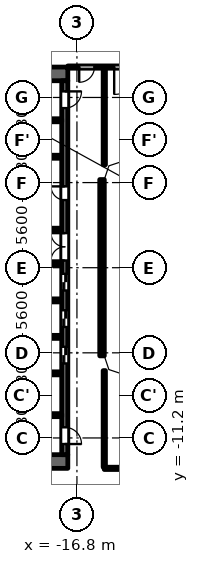
"""IFC4 building model, lengths in metres.
Left out: names, types, materials, properties, quantities, classifications, styles, units other than length and angle.
Written with IfcOpenShell. Run it as: python <this file> out.ifc"""

import sys

from ifc_helpers import new_model, si_unit, direction, frame, frame_2d, origin, place, context, subcontext, project, spatial, polyline, rectangle, outline, extrude, element, fill, save


model = new_model("IFC4")
c1 = context("Model", 3, precision=1e-05, world=origin(), true_north=direction((0.0, 1.0)))
c2 = subcontext(c1, "Body", "Model", "MODEL_VIEW")
j1 = project(units=[si_unit("LENGTHUNIT", "METRE"), si_unit("PLANEANGLEUNIT", "RADIAN")], contexts=[c1])
p1 = place(None, origin())
s1 = spatial("IfcSite", under=j1, at=p1, CompositionType="ELEMENT")
p2 = place(p1, origin())
s2 = spatial("IfcBuilding", under=s1, at=p2, CompositionType="ELEMENT")
p3 = place(p2, frame((0.0, 0.0, 16.1)))
s3 = spatial("IfcBuildingStorey", under=s2, at=p3, CompositionType="ELEMENT", Elevation=16.1)
p4 = place(p3, frame((-15.15, -5.8, 0.0), z_axis=(0.0, 0.0, 1.0), x_axis=(0.0, 1.0, 0.0)))
e1 = element("IfcWall", 1, at=p4, inside=s3, PredefinedType="SOLIDWALL", context=c2, shape_type="SweptSolid", body=[
    extrude(rectangle(XDim=11.6, YDim=0.3, at=frame_2d((5.8, 0.0))), origin(), (0.0, 0.0, 1.0), 4.45),
])
for number, where, z_axis, x_axis in (
    (2, (-17.4, 12.75, 0.0), (0.0, 0.0, 1.0), (-1.0, 0.0, 0.0)),
    (3, (-17.4, -12.75, 0.0), (0.0, 0.0, 1.0), (-1.0, 0.0, 0.0)),
):
    element("IfcWall", number, at=place(p3, frame(where, z_axis=z_axis, x_axis=x_axis)), inside=s3, PredefinedType="SHEAR", context=c2, shape_type="SweptSolid", body=[
        extrude(rectangle(XDim=10.4, YDim=0.9, at=frame_2d((5.2, 0.0))), origin(), (0.0, 0.0, 1.0), 4.45),
    ])
p5 = place(p3, frame((-17.6, -12.3, 0.0), z_axis=(0.0, 0.0, 1.0), x_axis=(0.0, 1.0, 0.0)))
e4 = element("IfcWall", 4, at=p5, inside=s3, PredefinedType="SHEAR", context=c2, shape_type="SweptSolid", body=[
    extrude(rectangle(XDim=24.6, YDim=0.4, at=frame_2d((12.3, 0.0))), origin(), (0.0, 0.0, 1.0), 4.45),
])
p6 = place(p5, frame((6.0, 0.0, 0.0)))
e5 = element("IfcOpeningElement", 5, at=p6, cuts=e4, PredefinedType="OPENING", context=c2, shape_type="SweptSolid", body=[
    extrude(rectangle(XDim=1.1, YDim=2.1, at=frame_2d((0.55, 1.05))), frame((0.0, 0.21, 0.0), z_axis=(0.0, -1.0, 0.0), x_axis=(1.0, 0.0, 0.0)), (0.0, 0.0, 1.0), 0.42),
])
p7 = place(p5, frame((8.4, 0.0, 0.0)))
e6 = element("IfcOpeningElement", 6, at=p7, cuts=e4, PredefinedType="OPENING", context=c2, shape_type="SweptSolid", body=[
    extrude(rectangle(XDim=1.1, YDim=2.1, at=frame_2d((0.55, 1.05))), frame((0.0, 0.21, 0.0), z_axis=(0.0, -1.0, 0.0), x_axis=(1.0, 0.0, 0.0)), (0.0, 0.0, 1.0), 0.42),
])
p8 = place(p5, frame((10.8, 0.0, 0.0)))
e7 = element("IfcOpeningElement", 7, at=p8, cuts=e4, PredefinedType="OPENING", context=c2, shape_type="SweptSolid", body=[
    extrude(rectangle(XDim=1.1, YDim=2.1, at=frame_2d((0.55, 1.05))), frame((0.0, 0.21, 0.0), z_axis=(0.0, -1.0, 0.0), x_axis=(1.0, 0.0, 0.0)), (0.0, 0.0, 1.0), 0.42),
])
p9 = place(p5, frame((16.75, 0.0, 0.0)))
e8 = element("IfcOpeningElement", 8, at=p9, cuts=e4, PredefinedType="OPENING", context=c2, shape_type="SweptSolid", body=[
    extrude(rectangle(XDim=0.9, YDim=2.1, at=frame_2d((0.45, 1.05))), frame((0.0, 0.21, 0.0), z_axis=(0.0, -1.0, 0.0), x_axis=(1.0, 0.0, 0.0)), (0.0, 0.0, 1.0), 0.42),
])
p10 = place(p5, frame((22.8, 0.0, 0.0)))
e9 = element("IfcOpeningElement", 9, at=p10, cuts=e4, PredefinedType="OPENING", context=c2, shape_type="SweptSolid", body=[
    extrude(rectangle(XDim=1.1, YDim=2.1, at=frame_2d((0.55, 1.05))), frame((0.0, 0.21, 0.0), z_axis=(0.0, -1.0, 0.0), x_axis=(1.0, 0.0, 0.0)), (0.0, 0.0, 1.0), 0.42),
])
p11 = place(p5, frame((0.7, 0.0, 0.0)))
e10 = element("IfcOpeningElement", 10, at=p11, cuts=e4, PredefinedType="OPENING", context=c2, shape_type="SweptSolid", body=[
    extrude(rectangle(XDim=1.1, YDim=2.1, at=frame_2d((0.55, 1.05))), frame((0.0, 0.21, 0.0), z_axis=(0.0, -1.0, 0.0), x_axis=(1.0, 0.0, 0.0)), (0.0, 0.0, 1.0), 0.42),
])
p12 = place(p5, frame((12.775, 0.0, 0.0)))
e11 = element("IfcOpeningElement", 11, at=p12, cuts=e4, PredefinedType="OPENING", context=c2, shape_type="SweptSolid", body=[
    extrude(rectangle(XDim=1.8, YDim=2.1, at=frame_2d((0.9, 1.05))), frame((0.0, 0.21, 0.0), z_axis=(0.0, -1.0, 0.0), x_axis=(1.0, 0.0, 0.0)), (0.0, 0.0, 1.0), 0.42),
])
p13 = place(p3, frame((-17.8, -9.7, 0.0), z_axis=(0.0, 0.0, 1.0), x_axis=(-1.0, 0.0, 0.0)))
e12 = element("IfcWall", 12, at=p13, inside=s3, PredefinedType="SHEAR", context=c2, shape_type="SweptSolid", body=[
    extrude(rectangle(XDim=8.3, YDim=0.2, at=frame_2d((4.15, 0.0))), origin(), (0.0, 0.0, 1.0), 4.45),
])
p14 = place(p13, frame((0.85, 0.0, 0.0)))
e13 = element("IfcOpeningElement", 13, at=p14, cuts=e12, PredefinedType="OPENING", context=c2, shape_type="SweptSolid", body=[
    extrude(rectangle(XDim=1.1, YDim=2.1, at=frame_2d((0.55, 1.05))), frame((0.0, 0.11, 0.0), z_axis=(0.0, -1.0, 0.0), x_axis=(1.0, 0.0, 0.0)), (0.0, 0.0, 1.0), 0.22),
])
p15 = place(p13, frame((3.75, 0.0, 0.0)))
e14 = element("IfcOpeningElement", 14, at=p15, cuts=e12, PredefinedType="OPENING", context=c2, shape_type="SweptSolid", body=[
    extrude(rectangle(XDim=1.1, YDim=2.1, at=frame_2d((0.55, 1.05))), frame((0.0, 0.11, 0.0), z_axis=(0.0, -1.0, 0.0), x_axis=(1.0, 0.0, 0.0)), (0.0, 0.0, 1.0), 0.22),
])
for number, where, z_axis, x_axis in (
    (15, (-17.8, -6.95, 0.0), (0.0, 0.0, 1.0), (-1.0, 0.0, 0.0)),
    (16, (-17.8, -4.55, 0.0), (0.0, 0.0, 1.0), (-1.0, 0.0, 0.0)),
    (17, (-17.8, -2.15, 0.0), (0.0, 0.0, 1.0), (-1.0, 0.0, 0.0)),
):
    element("IfcWall", number, at=place(p3, frame(where, z_axis=z_axis, x_axis=x_axis)), inside=s3, PredefinedType="PARTITIONING", context=c2, shape_type="SweptSolid", body=[
        extrude(rectangle(XDim=2.8, YDim=0.2, at=frame_2d((1.4, 0.0))), origin(), (0.0, 0.0, 1.0), 4.45),
    ])
for number, where, z_axis, x_axis in (
    (18, (-17.8, 0.25, 0.0), (0.0, 0.0, 1.0), (-1.0, 0.0, 0.0)),
    (19, (-17.8, 2.5, 0.0), (0.0, 0.0, 1.0), (-1.0, 0.0, 0.0)),
):
    element("IfcWall", number, at=place(p3, frame(where, z_axis=z_axis, x_axis=x_axis)), inside=s3, PredefinedType="PARTITIONING", context=c2, shape_type="SweptSolid", body=[
        extrude(rectangle(XDim=3.0, YDim=0.2, at=frame_2d((1.5, 0.0))), origin(), (0.0, 0.0, 1.0), 4.45),
    ])
p16 = place(p3, frame((-17.8, 7.3, 0.0), z_axis=(0.0, 0.0, 1.0), x_axis=(-1.0, 0.0, 0.0)))
e20 = element("IfcWall", 20, at=p16, inside=s3, PredefinedType="PARTITIONING", context=c2, shape_type="SweptSolid", body=[
    extrude(rectangle(XDim=2.8, YDim=0.2, at=frame_2d((1.4, 0.0))), origin(), (0.0, 0.0, 1.0), 4.45),
])
p17 = place(p3, frame((-17.8, 9.7, 0.0), z_axis=(0.0, 0.0, 1.0), x_axis=(-1.0, 0.0, 0.0)))
e21 = element("IfcWall", 21, at=p17, inside=s3, PredefinedType="SHEAR", context=c2, shape_type="SweptSolid", body=[
    extrude(rectangle(XDim=8.3, YDim=0.2, at=frame_2d((4.15, 0.0))), origin(), (0.0, 0.0, 1.0), 4.45),
])
p18 = place(p17, frame((0.85, 0.0, 0.0)))
e22 = element("IfcOpeningElement", 22, at=p18, cuts=e21, PredefinedType="OPENING", context=c2, shape_type="SweptSolid", body=[
    extrude(rectangle(XDim=1.1, YDim=2.1, at=frame_2d((0.55, 1.05))), frame((0.0, 0.11, 0.0), z_axis=(0.0, -1.0, 0.0), x_axis=(1.0, 0.0, 0.0)), (0.0, 0.0, 1.0), 0.22),
])
p19 = place(p17, frame((3.75, 0.0, 0.0)))
e23 = element("IfcOpeningElement", 23, at=p19, cuts=e21, PredefinedType="OPENING", context=c2, shape_type="SweptSolid", body=[
    extrude(rectangle(XDim=1.1, YDim=2.1, at=frame_2d((0.55, 1.05))), frame((0.0, 0.11, 0.0), z_axis=(0.0, -1.0, 0.0), x_axis=(1.0, 0.0, 0.0)), (0.0, 0.0, 1.0), 0.22),
])
p20 = place(p3, frame((-15.005, -13.2, 0.0), z_axis=(0.0, 0.0, 1.0), x_axis=(1.0, 0.0, 0.0)))
e24 = element("IfcWall", 24, at=p20, inside=s3, PredefinedType="PARTITIONING", context=c2, shape_type="SweptSolid", body=[
    extrude(rectangle(XDim=30.01, YDim=0.15, at=frame_2d((15.005, 0.0))), origin(), (0.0, 0.0, 1.0), 4.45),
])
p21 = place(p20, frame((16.855, 0.0, 0.0)))
e25 = element("IfcOpeningElement", 25, at=p21, cuts=e24, PredefinedType="OPENING", context=c2, shape_type="SweptSolid", body=[
    extrude(rectangle(XDim=1.8, YDim=2.1, at=frame_2d((0.9, 1.05))), frame((0.0, 0.085, 0.0), z_axis=(0.0, -1.0, 0.0), x_axis=(1.0, 0.0, 0.0)), (0.0, 0.0, 1.0), 0.17),
])
p22 = place(p3, frame((-17.4, 13.2, 0.0), z_axis=(0.0, 0.0, 1.0), x_axis=(1.0, 0.0, 0.0)))
e26 = element("IfcWall", 26, at=p22, inside=s3, PredefinedType="PARTITIONING", context=c2, shape_type="SweptSolid", body=[
    extrude(rectangle(XDim=34.8, YDim=0.15, at=frame_2d((17.4, 0.0))), origin(), (0.0, 0.0, 1.0), 4.45),
])
p23 = place(p22, frame((3.05, 0.0, 0.0)))
e27 = element("IfcOpeningElement", 27, at=p23, cuts=e26, PredefinedType="OPENING", context=c2, shape_type="SweptSolid", body=[
    extrude(rectangle(XDim=1.8, YDim=2.1, at=frame_2d((0.9, 1.05))), frame((0.0, 0.085, 0.0), z_axis=(0.0, -1.0, 0.0), x_axis=(1.0, 0.0, 0.0)), (0.0, 0.0, 1.0), 0.17),
])
p24 = place(p22, frame((0.75, 0.0, 0.0)))
e28 = element("IfcOpeningElement", 28, at=p24, cuts=e26, PredefinedType="OPENING", context=c2, shape_type="SweptSolid", body=[
    extrude(rectangle(XDim=1.0, YDim=2.1, at=frame_2d((0.5, 1.05))), frame((0.0, 0.085, 0.0), z_axis=(0.0, -1.0, 0.0), x_axis=(1.0, 0.0, 0.0)), (0.0, 0.0, 1.0), 0.17),
])
p25 = place(p22, frame((33.15, 0.0, 0.0)))
e29 = element("IfcOpeningElement", 29, at=p25, cuts=e26, PredefinedType="OPENING", context=c2, shape_type="SweptSolid", body=[
    extrude(rectangle(XDim=1.0, YDim=2.1, at=frame_2d((0.5, 1.05))), frame((0.0, 0.085, 0.0), z_axis=(0.0, -1.0, 0.0), x_axis=(1.0, 0.0, 0.0)), (0.0, 0.0, 1.0), 0.17),
])
for number, where, z_axis, x_axis in (
    (30, (-15.0, -13.125, 0.0), (0.0, 0.0, 1.0), (0.0, 1.0, 0.0)),
    (31, (-15.0, 6.769, 0.0), (0.0, 0.0, 1.0), (0.0, 1.0, 0.0)),
):
    element("IfcWall", number, at=place(p3, frame(where, z_axis=z_axis, x_axis=x_axis)), inside=s3, PredefinedType="PARTITIONING", context=c2, shape_type="SweptSolid", body=[
        extrude(rectangle(XDim=6.356, YDim=0.15, at=frame_2d((3.178, 0.0))), origin(), (0.0, 0.0, 1.0), 4.45),
    ])
p26 = place(p3, origin())
e32 = element("IfcWall", 32, at=p26, inside=s3, PredefinedType="SOLIDWALL", context=c2, shape_type="SweptSolid", body=[
    extrude(outline(polyline([(-13.849, 7.3), (-14.937, 6.937), (-15.3, 5.849), (-15.3, 5.8), (-15.0, 5.8), (-14.7, 6.7), (-13.8, 7.0), (-13.8, 7.3), (-13.849, 7.3)])), origin(), (0.0, 0.0, 1.0), 4.45),
])
e33 = element("IfcWall", 33, at=p26, inside=s3, PredefinedType="SOLIDWALL", context=c2, shape_type="SweptSolid", body=[
    extrude(outline(polyline([(-14.937, -6.937), (-13.849, -7.3), (-13.8, -7.3), (-13.8, -7.0), (-14.7, -6.7), (-15.0, -5.8), (-15.3, -5.8), (-15.3, -5.849), (-14.937, -6.937)])), origin(), (0.0, 0.0, 1.0), 4.45),
])
p27 = place(p6, origin())
e34 = element("IfcDoor", 34, at=p27, inside=s3, OperationType="DOUBLE_DOOR_SLIDING", PredefinedType="DOOR", context=c2, shape_type="SweptSolid", body=[
    extrude(rectangle(XDim=1.1, YDim=2.1, at=frame_2d((0.55, 1.05))), frame((0.0, 0.025, 0.0), z_axis=(0.0, -1.0, 0.0), x_axis=(1.0, 0.0, 0.0)), (0.0, 0.0, 1.0), 0.05),
])
fill(e5, e34)
p28 = place(p7, origin())
e35 = element("IfcDoor", 35, at=p28, inside=s3, OperationType="DOUBLE_DOOR_SLIDING", PredefinedType="DOOR", context=c2, shape_type="SweptSolid", body=[
    extrude(rectangle(XDim=1.1, YDim=2.1, at=frame_2d((0.55, 1.05))), frame((0.0, 0.025, 0.0), z_axis=(0.0, -1.0, 0.0), x_axis=(1.0, 0.0, 0.0)), (0.0, 0.0, 1.0), 0.05),
])
fill(e6, e35)
p29 = place(p8, origin())
e36 = element("IfcDoor", 36, at=p29, inside=s3, OperationType="DOUBLE_DOOR_SLIDING", PredefinedType="DOOR", context=c2, shape_type="SweptSolid", body=[
    extrude(rectangle(XDim=1.1, YDim=2.1, at=frame_2d((0.55, 1.05))), frame((0.0, 0.025, 0.0), z_axis=(0.0, -1.0, 0.0), x_axis=(1.0, 0.0, 0.0)), (0.0, 0.0, 1.0), 0.05),
])
fill(e7, e36)
p30 = place(p9, origin())
e37 = element("IfcDoor", 37, at=p30, inside=s3, OperationType="SINGLE_SWING_LEFT", PredefinedType="DOOR", context=c2, shape_type="SweptSolid", body=[
    extrude(rectangle(XDim=0.9, YDim=2.1, at=frame_2d((0.45, 1.05))), frame((0.0, 0.025, 0.0), z_axis=(0.0, -1.0, 0.0), x_axis=(1.0, 0.0, 0.0)), (0.0, 0.0, 1.0), 0.05),
])
fill(e8, e37)
p31 = place(p10, origin())
e38 = element("IfcDoor", 38, at=p31, inside=s3, OperationType="SINGLE_SWING_RIGHT", PredefinedType="DOOR", context=c2, shape_type="SweptSolid", body=[
    extrude(rectangle(XDim=1.1, YDim=2.1, at=frame_2d((0.55, 1.05))), frame((0.0, 0.025, 0.0), z_axis=(0.0, -1.0, 0.0), x_axis=(1.0, 0.0, 0.0)), (0.0, 0.0, 1.0), 0.05),
])
fill(e9, e38)
p32 = place(p11, origin())
e39 = element("IfcDoor", 39, at=p32, inside=s3, OperationType="SINGLE_SWING_LEFT", PredefinedType="DOOR", context=c2, shape_type="SweptSolid", body=[
    extrude(rectangle(XDim=1.1, YDim=2.1, at=frame_2d((0.55, 1.05))), frame((0.0, 0.025, 0.0), z_axis=(0.0, -1.0, 0.0), x_axis=(1.0, 0.0, 0.0)), (0.0, 0.0, 1.0), 0.05),
])
fill(e10, e39)
p33 = place(p12, origin())
e40 = element("IfcDoor", 40, at=p33, inside=s3, OperationType="DOUBLE_DOOR_SINGLE_SWING", PredefinedType="DOOR", context=c2, shape_type="SweptSolid", body=[
    extrude(rectangle(XDim=1.8, YDim=2.1, at=frame_2d((0.9, 1.05))), frame((0.0, 0.025, 0.0), z_axis=(0.0, -1.0, 0.0), x_axis=(1.0, 0.0, 0.0)), (0.0, 0.0, 1.0), 0.05),
])
fill(e11, e40)
p34 = place(p23, origin())
e41 = element("IfcDoor", 41, at=p34, inside=s3, OperationType="SINGLE_SWING_LEFT", PredefinedType="DOOR", context=c2, shape_type="SweptSolid", body=[
    extrude(rectangle(XDim=1.8, YDim=2.1, at=frame_2d((0.9, 1.05))), frame((0.0, 0.025, 0.0), z_axis=(0.0, -1.0, 0.0), x_axis=(1.0, 0.0, 0.0)), (0.0, 0.0, 1.0), 0.05),
])
fill(e27, e41)
p35 = place(p24, origin())
e42 = element("IfcDoor", 42, at=p35, inside=s3, OperationType="SINGLE_SWING_LEFT", PredefinedType="DOOR", context=c2, shape_type="SweptSolid", body=[
    extrude(rectangle(XDim=1.0, YDim=2.1, at=frame_2d((0.5, 1.05))), frame((0.0, 0.025, 0.0), z_axis=(0.0, -1.0, 0.0), x_axis=(1.0, 0.0, 0.0)), (0.0, 0.0, 1.0), 0.05),
])
fill(e28, e42)
save(model, sys.argv[1])
